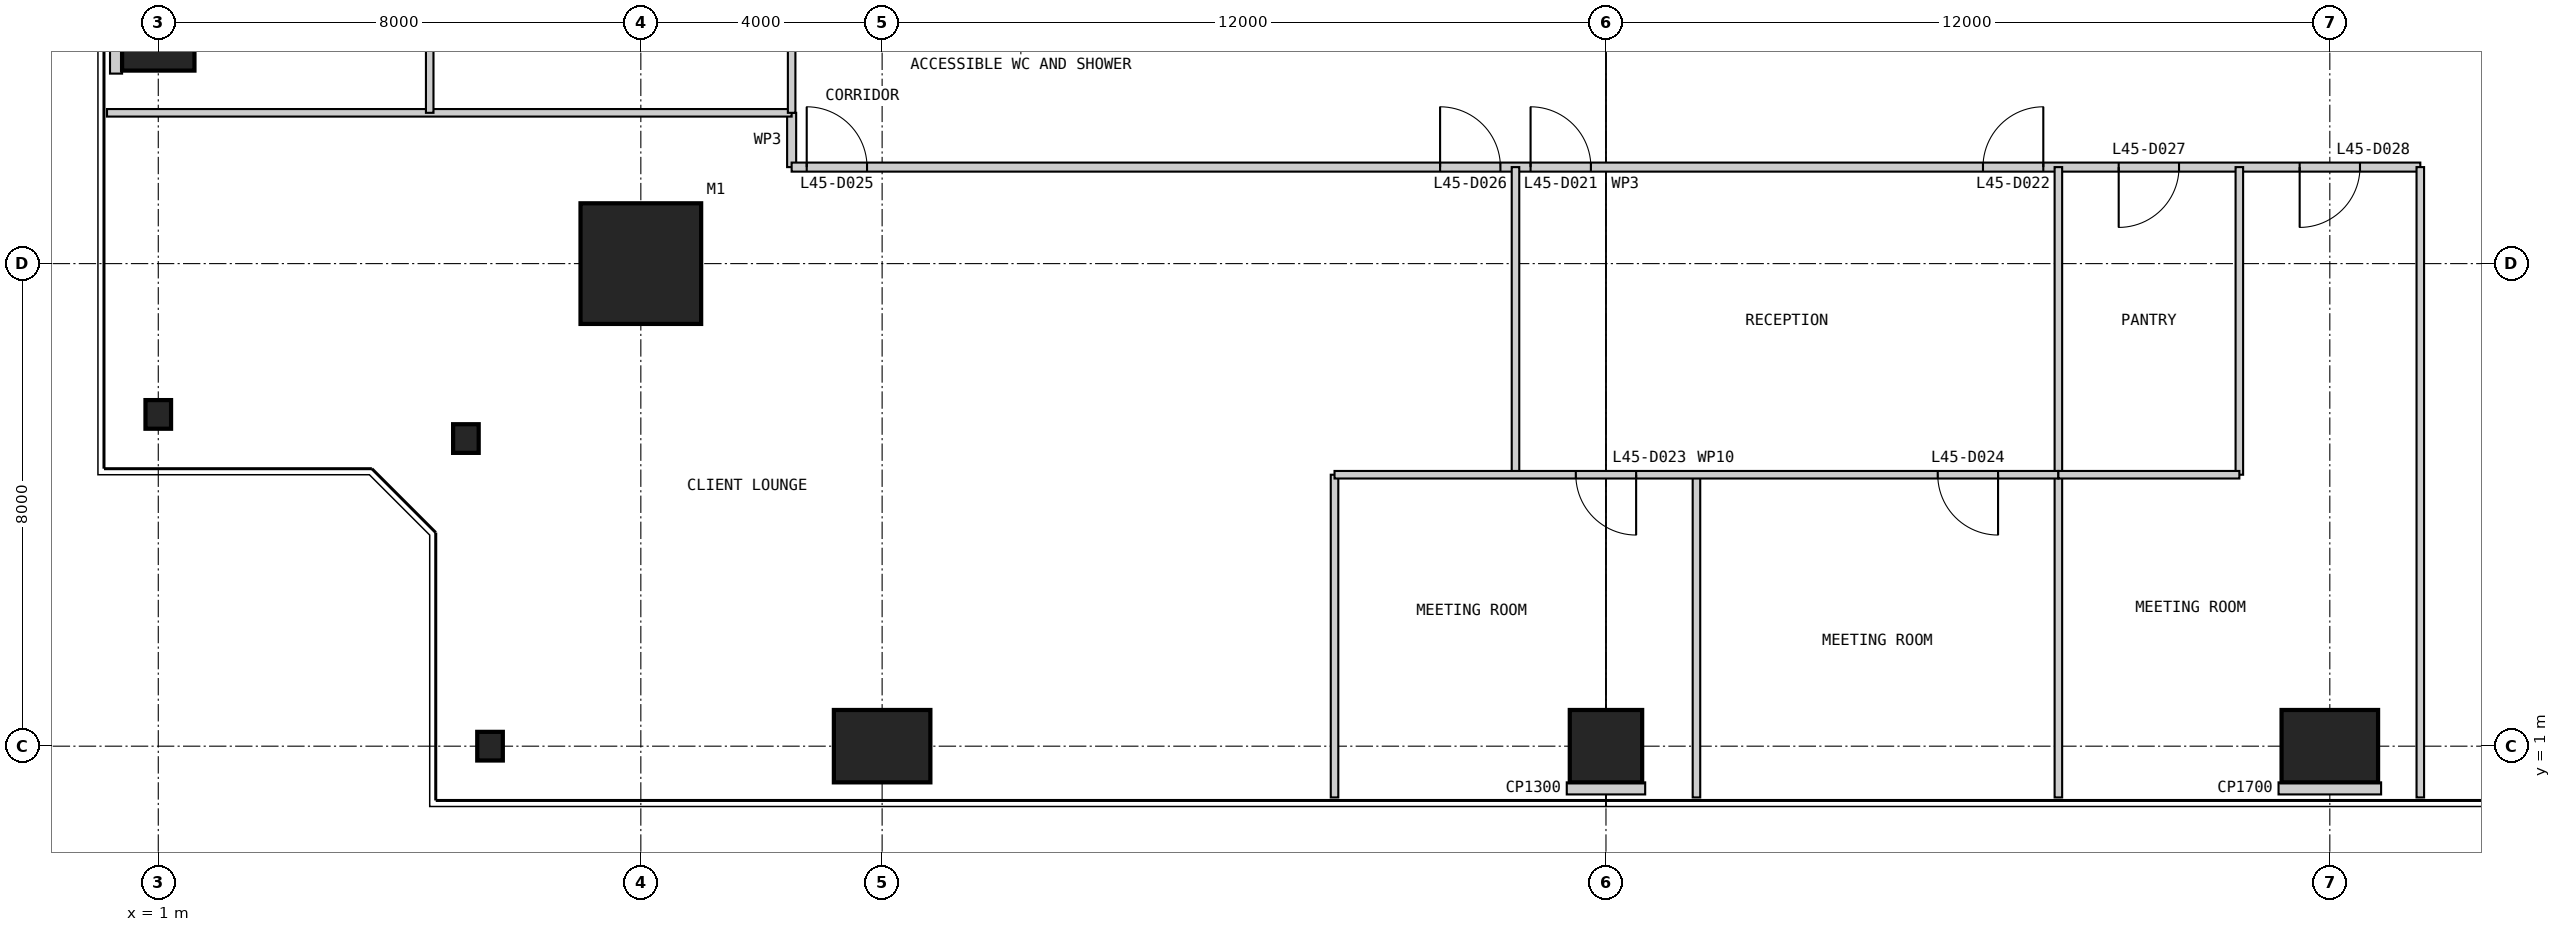
"""IFC4 building model, lengths in metres.
Left out: names, types, materials, properties, quantities, classifications, styles, units other than length and angle.
Written with IfcOpenShell. Run it as: python <this file> out.ifc"""

import sys

from ifc_helpers import new_model, si_unit, direction, frame, frame_2d, origin, origin_2d, place, context, subcontext, project, spatial, rectangle, i_section, extrude, element, fill, save


model = new_model("IFC4")
c1 = context("Model", 3, precision=1e-05, world=origin(), true_north=direction((0.0, 1.0)))
c2 = subcontext(c1, "Body", "Model", "MODEL_VIEW")
j1 = project(units=[si_unit("LENGTHUNIT", "METRE"), si_unit("PLANEANGLEUNIT", "RADIAN")], contexts=[c1])
p1 = place(None, origin())
s1 = spatial("IfcSite", under=j1, at=p1, CompositionType="ELEMENT")
p2 = place(p1, origin())
s2 = spatial("IfcBuilding", under=s1, at=p2, CompositionType="ELEMENT")
p3 = place(p2, frame((0.0, 0.0, 193.8)))
s3 = spatial("IfcBuildingStorey", under=s2, at=p3, CompositionType="ELEMENT", Elevation=193.8)
p4 = place(p3, frame((9.0, 9.0, 0.0), z_axis=(0.0, 0.0, 1.0), x_axis=(1.0, 0.0, 0.0)))
e1 = element("IfcColumn", 1, at=p4, inside=s3, PredefinedType="COLUMN", context=c2, shape_type="SweptSolid", body=[
    extrude(rectangle(XDim=2.0, YDim=2.0, at=origin_2d()), origin(), (0.0, 0.0, 1.0), 4.0),
])
p5 = place(p3, frame((6.5, 1.0, 0.0), z_axis=(0.0, 0.0, 1.0), x_axis=(1.0, 0.0, 0.0)))
e2 = element("IfcColumn", 2, at=p5, inside=s3, PredefinedType="COLUMN", context=c2, shape_type="SweptSolid", body=[
    extrude(i_section(OverallWidth=0.424, OverallDepth=0.475, WebThickness=0.048, FlangeThickness=0.077, at=origin_2d()), origin(), (0.0, 0.0, 1.0), 4.0),
])
p6 = place(p3, frame((13.0, 1.0, 0.0), z_axis=(0.0, 0.0, 1.0), x_axis=(1.0, 0.0, 0.0)))
e3 = element("IfcColumn", 3, at=p6, inside=s3, PredefinedType="COLUMN", context=c2, shape_type="SweptSolid", body=[
    extrude(rectangle(XDim=1.6, YDim=1.2, at=origin_2d()), origin(), (0.0, 0.0, 1.0), 4.0),
])
p7 = place(p3, frame((25.0, 1.0, 0.0), z_axis=(0.0, 0.0, 1.0), x_axis=(1.0, 0.0, 0.0)))
e4 = element("IfcColumn", 4, at=p7, inside=s3, PredefinedType="COLUMN", context=c2, shape_type="SweptSolid", body=[
    extrude(rectangle(XDim=1.2, YDim=1.2, at=origin_2d()), origin(), (0.0, 0.0, 1.0), 4.0),
])
p8 = place(p3, frame((37.0, 1.0, 0.0), z_axis=(0.0, 0.0, 1.0), x_axis=(1.0, 0.0, 0.0)))
e5 = element("IfcColumn", 5, at=p8, inside=s3, PredefinedType="COLUMN", context=c2, shape_type="SweptSolid", body=[
    extrude(rectangle(XDim=1.6, YDim=1.2, at=origin_2d()), origin(), (0.0, 0.0, 1.0), 4.0),
])
p9 = place(p3, frame((1.0, 13.0, 0.0), z_axis=(0.0, 0.0, 1.0), x_axis=(1.0, 0.0, 0.0)))
e6 = element("IfcColumn", 6, at=p9, inside=s3, PredefinedType="COLUMN", context=c2, shape_type="SweptSolid", body=[
    extrude(rectangle(XDim=1.2, YDim=1.6, at=origin_2d()), origin(), (0.0, 0.0, 1.0), 4.0),
])
for number, where, z_axis, x_axis in (
    (7, (1.0, 6.5, 0.0), (0.0, 0.0, 1.0), (1.0, 0.0, 0.0)),
    (8, (6.1, 6.1, 0.0), (0.0, 0.0, 1.0), (1.0, 0.0, 0.0)),
):
    element("IfcColumn", number, at=place(p3, frame(where, z_axis=z_axis, x_axis=x_axis)), inside=s3, PredefinedType="COLUMN", context=c2, shape_type="SweptSolid", body=[
        extrude(i_section(OverallWidth=0.424, OverallDepth=0.475, WebThickness=0.048, FlangeThickness=0.077, at=origin_2d()), origin(), (0.0, 0.0, 1.0), 4.0),
    ])
p10 = place(p3, frame((11.5, 11.5, 0.0), z_axis=(0.0, 0.0, 1.0), x_axis=(0.0, -1.0, 0.0)))
e9 = element("IfcWall", 9, at=p10, inside=s3, PredefinedType="PARTITIONING", context=c2, shape_type="SweptSolid", body=[
    extrude(rectangle(XDim=0.9, YDim=0.15, at=frame_2d((0.45, 0.0))), origin(), (0.0, 0.0, 1.0), 3.85),
])
p11 = place(p3, frame((11.5, 10.6, 0.0), z_axis=(0.0, 0.0, 1.0), x_axis=(1.0, 0.0, 0.0)))
e10 = element("IfcWall", 10, at=p11, inside=s3, PredefinedType="PARTITIONING", context=c2, shape_type="SweptSolid", body=[
    extrude(rectangle(XDim=27.0, YDim=0.15, at=frame_2d((13.5, 0.0))), origin(), (0.0, 0.0, 1.0), 3.85),
])
p12 = place(p11, frame((12.25, 0.0, 0.0)))
e11 = element("IfcOpeningElement", 11, at=p12, cuts=e10, PredefinedType="OPENING", context=c2, shape_type="SweptSolid", body=[
    extrude(rectangle(XDim=1.0, YDim=2.2, at=frame_2d((0.5, 1.1))), frame((0.0, 0.085, 0.0), z_axis=(0.0, -1.0, 0.0), x_axis=(1.0, 0.0, 0.0)), (0.0, 0.0, 1.0), 0.17),
])
p13 = place(p11, frame((19.75, 0.0, 0.0)))
e12 = element("IfcOpeningElement", 12, at=p13, cuts=e10, PredefinedType="OPENING", context=c2, shape_type="SweptSolid", body=[
    extrude(rectangle(XDim=1.0, YDim=2.2, at=frame_2d((0.5, 1.1))), frame((0.0, 0.085, 0.0), z_axis=(0.0, -1.0, 0.0), x_axis=(1.0, 0.0, 0.0)), (0.0, 0.0, 1.0), 0.17),
])
p14 = place(p11, frame((0.25, 0.0, 0.0)))
e13 = element("IfcOpeningElement", 13, at=p14, cuts=e10, PredefinedType="OPENING", context=c2, shape_type="SweptSolid", body=[
    extrude(rectangle(XDim=1.0, YDim=2.2, at=frame_2d((0.5, 1.1))), frame((0.0, 0.085, 0.0), z_axis=(0.0, -1.0, 0.0), x_axis=(1.0, 0.0, 0.0)), (0.0, 0.0, 1.0), 0.17),
])
p15 = place(p11, frame((10.75, 0.0, 0.0)))
e14 = element("IfcOpeningElement", 14, at=p15, cuts=e10, PredefinedType="OPENING", context=c2, shape_type="SweptSolid", body=[
    extrude(rectangle(XDim=1.0, YDim=2.2, at=frame_2d((0.5, 1.1))), frame((0.0, 0.085, 0.0), z_axis=(0.0, -1.0, 0.0), x_axis=(1.0, 0.0, 0.0)), (0.0, 0.0, 1.0), 0.17),
])
p16 = place(p11, frame((22.0, 0.0, 0.0)))
e15 = element("IfcOpeningElement", 15, at=p16, cuts=e10, PredefinedType="OPENING", context=c2, shape_type="SweptSolid", body=[
    extrude(rectangle(XDim=1.0, YDim=2.2, at=frame_2d((0.5, 1.1))), frame((0.0, 0.085, 0.0), z_axis=(0.0, -1.0, 0.0), x_axis=(1.0, 0.0, 0.0)), (0.0, 0.0, 1.0), 0.17),
])
p17 = place(p11, frame((25.0, 0.0, 0.0)))
e16 = element("IfcOpeningElement", 16, at=p17, cuts=e10, PredefinedType="OPENING", context=c2, shape_type="SweptSolid", body=[
    extrude(rectangle(XDim=1.0, YDim=2.2, at=frame_2d((0.5, 1.1))), frame((0.0, 0.085, 0.0), z_axis=(0.0, -1.0, 0.0), x_axis=(1.0, 0.0, 0.0)), (0.0, 0.0, 1.0), 0.17),
])
p18 = place(p3, frame((0.15, 11.5, 0.0), z_axis=(0.0, 0.0, 1.0), x_axis=(1.0, 0.0, 0.0)))
e17 = element("IfcWall", 17, at=p18, inside=s3, PredefinedType="PARTITIONING", context=c2, shape_type="SweptSolid", body=[
    extrude(rectangle(XDim=11.35, YDim=0.125, at=frame_2d((5.675, 0.0))), origin(), (0.0, 0.0, 1.0), 3.85),
])
p19 = place(p3, frame((20.5, 0.15, 0.0), z_axis=(0.0, 0.0, 1.0), x_axis=(0.0, 1.0, 0.0)))
e18 = element("IfcWall", 18, at=p19, inside=s3, PredefinedType="PARTITIONING", context=c2, shape_type="SweptSolid", body=[
    extrude(rectangle(XDim=5.35, YDim=0.125, at=frame_2d((2.675, 0.0))), origin(), (0.0, 0.0, 1.0), 3.85),
])
p20 = place(p3, frame((23.5, 5.5, 0.0), z_axis=(0.0, 0.0, 1.0), x_axis=(0.0, 1.0, 0.0)))
e19 = element("IfcWall", 19, at=p20, inside=s3, PredefinedType="PARTITIONING", context=c2, shape_type="SweptSolid", body=[
    extrude(rectangle(XDim=5.1, YDim=0.125, at=frame_2d((2.55, 0.0))), origin(), (0.0, 0.0, 1.0), 3.85),
])
p21 = place(p3, frame((26.5, 0.15, 0.0), z_axis=(0.0, 0.0, 1.0), x_axis=(0.0, 1.0, 0.0)))
e20 = element("IfcWall", 20, at=p21, inside=s3, PredefinedType="PARTITIONING", context=c2, shape_type="SweptSolid", body=[
    extrude(rectangle(XDim=5.35, YDim=0.125, at=frame_2d((2.675, 0.0))), origin(), (0.0, 0.0, 1.0), 3.85),
])
p22 = place(p3, frame((32.5, 0.15, 0.0), z_axis=(0.0, 0.0, 1.0), x_axis=(0.0, 1.0, 0.0)))
e21 = element("IfcWall", 21, at=p22, inside=s3, PredefinedType="PARTITIONING", context=c2, shape_type="SweptSolid", body=[
    extrude(rectangle(XDim=10.45, YDim=0.125, at=frame_2d((5.225, 0.0))), origin(), (0.0, 0.0, 1.0), 3.85),
])
p23 = place(p3, frame((35.5, 5.5, 0.0), z_axis=(0.0, 0.0, 1.0), x_axis=(0.0, 1.0, 0.0)))
e22 = element("IfcWall", 22, at=p23, inside=s3, PredefinedType="PARTITIONING", context=c2, shape_type="SweptSolid", body=[
    extrude(rectangle(XDim=5.1, YDim=0.125, at=frame_2d((2.55, 0.0))), origin(), (0.0, 0.0, 1.0), 3.85),
])
p24 = place(p3, frame((20.5, 5.5, 0.0), z_axis=(0.0, 0.0, 1.0), x_axis=(1.0, 0.0, 0.0)))
e23 = element("IfcWall", 23, at=p24, inside=s3, PredefinedType="PARTITIONING", context=c2, shape_type="SweptSolid", body=[
    extrude(rectangle(XDim=12.0, YDim=0.125, at=frame_2d((6.0, 0.0))), origin(), (0.0, 0.0, 1.0), 3.85),
])
p25 = place(p24, frame((4.0, 0.0, 0.0)))
e24 = element("IfcOpeningElement", 24, at=p25, cuts=e23, PredefinedType="OPENING", context=c2, shape_type="SweptSolid", body=[
    extrude(rectangle(XDim=1.0, YDim=2.2, at=frame_2d((0.5, 1.1))), frame((0.0, 0.073, 0.0), z_axis=(0.0, -1.0, 0.0), x_axis=(1.0, 0.0, 0.0)), (0.0, 0.0, 1.0), 0.145),
])
p26 = place(p24, frame((10.0, 0.0, 0.0)))
e25 = element("IfcOpeningElement", 25, at=p26, cuts=e23, PredefinedType="OPENING", context=c2, shape_type="SweptSolid", body=[
    extrude(rectangle(XDim=1.0, YDim=2.2, at=frame_2d((0.5, 1.1))), frame((0.0, 0.073, 0.0), z_axis=(0.0, -1.0, 0.0), x_axis=(1.0, 0.0, 0.0)), (0.0, 0.0, 1.0), 0.145),
])
p27 = place(p3, frame((32.5, 5.5, 0.0), z_axis=(0.0, 0.0, 1.0), x_axis=(1.0, 0.0, 0.0)))
e26 = element("IfcWall", 26, at=p27, inside=s3, PredefinedType="PARTITIONING", context=c2, shape_type="SweptSolid", body=[
    extrude(rectangle(XDim=3.0, YDim=0.125, at=frame_2d((1.5, 0.0))), origin(), (0.0, 0.0, 1.0), 3.85),
])
p28 = place(p3, frame((38.5, 0.15, 0.0), z_axis=(0.0, 0.0, 1.0), x_axis=(0.0, 1.0, 0.0)))
e27 = element("IfcWall", 27, at=p28, inside=s3, PredefinedType="PARTITIONING", context=c2, shape_type="SweptSolid", body=[
    extrude(rectangle(XDim=10.45, YDim=0.125, at=frame_2d((5.225, 0.0))), origin(), (0.0, 0.0, 1.0), 3.85),
])
p29 = place(p3, frame((5.5, 35.5, 0.0), z_axis=(0.0, 0.0, 1.0), x_axis=(0.0, -1.0, 0.0)))
e28 = element("IfcWall", 28, at=p29, inside=s3, PredefinedType="PARTITIONING", context=c2, shape_type="SweptSolid", body=[
    extrude(rectangle(XDim=24.0, YDim=0.125, at=frame_2d((12.0, 0.0))), origin(), (0.0, 0.0, 1.0), 3.85),
])
p30 = place(p29, frame((4.05, 0.0, 0.0)))
e29 = element("IfcOpeningElement", 29, at=p30, cuts=e28, PredefinedType="OPENING", context=c2, shape_type="SweptSolid", body=[
    extrude(rectangle(XDim=0.9, YDim=2.2, at=frame_2d((0.45, 1.1))), frame((0.0, 0.073, 0.0), z_axis=(0.0, -1.0, 0.0), x_axis=(1.0, 0.0, 0.0)), (0.0, 0.0, 1.0), 0.145),
])
p31 = place(p29, frame((10.05, 0.0, 0.0)))
e30 = element("IfcOpeningElement", 30, at=p31, cuts=e28, PredefinedType="OPENING", context=c2, shape_type="SweptSolid", body=[
    extrude(rectangle(XDim=0.9, YDim=2.2, at=frame_2d((0.45, 1.1))), frame((0.0, 0.073, 0.0), z_axis=(0.0, -1.0, 0.0), x_axis=(1.0, 0.0, 0.0)), (0.0, 0.0, 1.0), 0.145),
])
p32 = place(p29, frame((16.05, 0.0, 0.0)))
e31 = element("IfcOpeningElement", 31, at=p32, cuts=e28, PredefinedType="OPENING", context=c2, shape_type="SweptSolid", body=[
    extrude(rectangle(XDim=0.9, YDim=2.2, at=frame_2d((0.45, 1.1))), frame((0.0, 0.073, 0.0), z_axis=(0.0, -1.0, 0.0), x_axis=(1.0, 0.0, 0.0)), (0.0, 0.0, 1.0), 0.145),
])
p33 = place(p29, frame((19.05, 0.0, 0.0)))
e32 = element("IfcOpeningElement", 32, at=p33, cuts=e28, PredefinedType="OPENING", context=c2, shape_type="SweptSolid", body=[
    extrude(rectangle(XDim=0.9, YDim=2.2, at=frame_2d((0.45, 1.1))), frame((0.0, 0.073, 0.0), z_axis=(0.0, -1.0, 0.0), x_axis=(1.0, 0.0, 0.0)), (0.0, 0.0, 1.0), 0.145),
])
p34 = place(p3, frame((11.5, 14.5, 0.0), z_axis=(0.0, 0.0, 1.0), x_axis=(0.0, -1.0, 0.0)))
e33 = element("IfcWall", 33, at=p34, inside=s3, PredefinedType="PARTITIONING", context=c2, shape_type="SweptSolid", body=[
    extrude(rectangle(XDim=3.0, YDim=0.125, at=frame_2d((1.5, 0.0))), origin(), (0.0, 0.0, 1.0), 3.85),
])
p35 = place(p3, frame((25.0, 0.2, 0.0), z_axis=(0.0, 0.0, 1.0), x_axis=(0.0, 1.0, 0.0)))
e34 = element("IfcWall", 34, at=p35, inside=s3, PredefinedType="PARTITIONING", context=c2, shape_type="SweptSolid", body=[
    extrude(rectangle(XDim=0.2, YDim=1.3, at=frame_2d((0.1, 0.0))), origin(), (0.0, 0.0, 1.0), 3.85),
])
for number, where, z_axis, x_axis in (
    (35, (37.0, 0.2, 0.0), (0.0, 0.0, 1.0), (0.0, 1.0, 0.0)),
    (36, (0.2, 13.0, 0.0), (0.0, 0.0, 1.0), (1.0, 0.0, 0.0)),
):
    element("IfcWall", number, at=place(p3, frame(where, z_axis=z_axis, x_axis=x_axis)), inside=s3, PredefinedType="PARTITIONING", context=c2, shape_type="SweptSolid", body=[
        extrude(rectangle(XDim=0.2, YDim=1.7, at=frame_2d((0.1, 0.0))), origin(), (0.0, 0.0, 1.0), 3.85),
    ])
p36 = place(p12, origin())
e37 = element("IfcDoor", 37, at=p36, inside=s3, OperationType="SINGLE_SWING_LEFT", PredefinedType="DOOR", context=c2, shape_type="SweptSolid", body=[
    extrude(rectangle(XDim=1.0, YDim=2.2, at=frame_2d((0.5, 1.1))), frame((0.0, 0.025, 0.0), z_axis=(0.0, -1.0, 0.0), x_axis=(1.0, 0.0, 0.0)), (0.0, 0.0, 1.0), 0.05),
])
fill(e11, e37)
p37 = place(p13, origin())
e38 = element("IfcDoor", 38, at=p37, inside=s3, OperationType="SINGLE_SWING_RIGHT", PredefinedType="DOOR", context=c2, shape_type="SweptSolid", body=[
    extrude(rectangle(XDim=1.0, YDim=2.2, at=frame_2d((0.5, 1.1))), frame((0.0, 0.025, 0.0), z_axis=(0.0, -1.0, 0.0), x_axis=(1.0, 0.0, 0.0)), (0.0, 0.0, 1.0), 0.05),
])
fill(e12, e38)
p38 = place(p25, frame((1.0, 0.0, 0.0), z_axis=(0.0, 0.0, 1.0), x_axis=(-1.0, 0.0, 0.0)))
e39 = element("IfcDoor", 39, at=p38, inside=s3, OperationType="SINGLE_SWING_LEFT", PredefinedType="DOOR", context=c2, shape_type="SweptSolid", body=[
    extrude(rectangle(XDim=1.0, YDim=2.2, at=frame_2d((0.5, 1.1))), frame((0.0, 0.025, 0.0), z_axis=(0.0, -1.0, 0.0), x_axis=(1.0, 0.0, 0.0)), (0.0, 0.0, 1.0), 0.05),
])
fill(e24, e39)
p39 = place(p26, frame((1.0, 0.0, 0.0), z_axis=(0.0, 0.0, 1.0), x_axis=(-1.0, 0.0, 0.0)))
e40 = element("IfcDoor", 40, at=p39, inside=s3, OperationType="SINGLE_SWING_LEFT", PredefinedType="DOOR", context=c2, shape_type="SweptSolid", body=[
    extrude(rectangle(XDim=1.0, YDim=2.2, at=frame_2d((0.5, 1.1))), frame((0.0, 0.025, 0.0), z_axis=(0.0, -1.0, 0.0), x_axis=(1.0, 0.0, 0.0)), (0.0, 0.0, 1.0), 0.05),
])
fill(e25, e40)
p40 = place(p14, origin())
e41 = element("IfcDoor", 41, at=p40, inside=s3, OperationType="SINGLE_SWING_LEFT", PredefinedType="DOOR", context=c2, shape_type="SweptSolid", body=[
    extrude(rectangle(XDim=1.0, YDim=2.2, at=frame_2d((0.5, 1.1))), frame((0.0, 0.025, 0.0), z_axis=(0.0, -1.0, 0.0), x_axis=(1.0, 0.0, 0.0)), (0.0, 0.0, 1.0), 0.05),
])
fill(e13, e41)
p41 = place(p15, origin())
e42 = element("IfcDoor", 42, at=p41, inside=s3, OperationType="SINGLE_SWING_LEFT", PredefinedType="DOOR", context=c2, shape_type="SweptSolid", body=[
    extrude(rectangle(XDim=1.0, YDim=2.2, at=frame_2d((0.5, 1.1))), frame((0.0, 0.025, 0.0), z_axis=(0.0, -1.0, 0.0), x_axis=(1.0, 0.0, 0.0)), (0.0, 0.0, 1.0), 0.05),
])
fill(e14, e42)
p42 = place(p16, frame((1.0, 0.0, 0.0), z_axis=(0.0, 0.0, 1.0), x_axis=(-1.0, 0.0, 0.0)))
e43 = element("IfcDoor", 43, at=p42, inside=s3, OperationType="SINGLE_SWING_RIGHT", PredefinedType="DOOR", context=c2, shape_type="SweptSolid", body=[
    extrude(rectangle(XDim=1.0, YDim=2.2, at=frame_2d((0.5, 1.1))), frame((0.0, 0.025, 0.0), z_axis=(0.0, -1.0, 0.0), x_axis=(1.0, 0.0, 0.0)), (0.0, 0.0, 1.0), 0.05),
])
fill(e15, e43)
p43 = place(p17, frame((1.0, 0.0, 0.0), z_axis=(0.0, 0.0, 1.0), x_axis=(-1.0, 0.0, 0.0)))
e44 = element("IfcDoor", 44, at=p43, inside=s3, OperationType="SINGLE_SWING_RIGHT", PredefinedType="DOOR", context=c2, shape_type="SweptSolid", body=[
    extrude(rectangle(XDim=1.0, YDim=2.2, at=frame_2d((0.5, 1.1))), frame((0.0, 0.025, 0.0), z_axis=(0.0, -1.0, 0.0), x_axis=(1.0, 0.0, 0.0)), (0.0, 0.0, 1.0), 0.05),
])
fill(e16, e44)
save(model, sys.argv[1])
